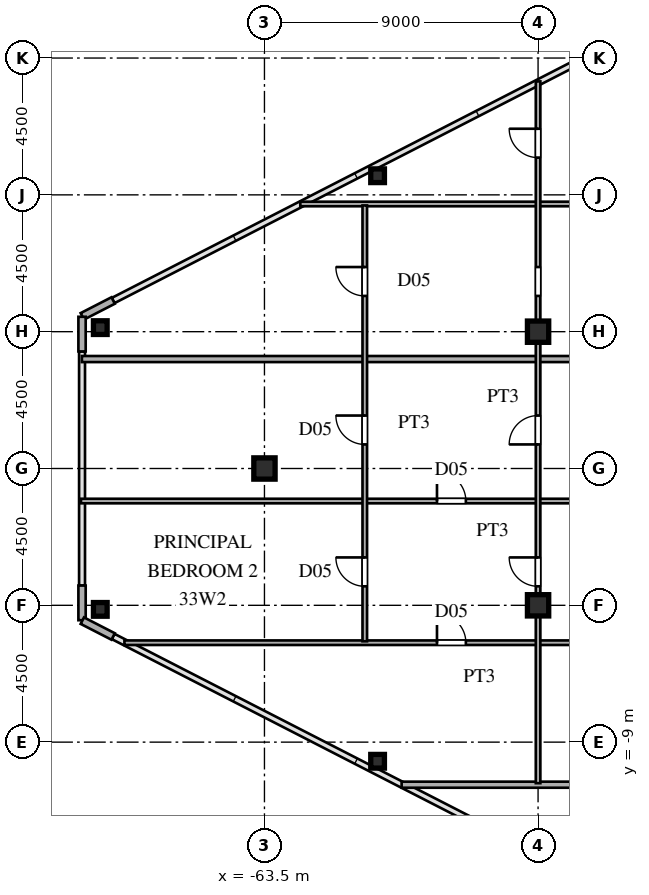
"""IFC4 building model, lengths in metres.
Left out: names, types, materials, properties, quantities, classifications, styles, units other than length and angle.
Written with IfcOpenShell. Run it as: python <this file> out.ifc"""

import sys

from ifc_helpers import new_model, si_unit, direction, frame, frame_2d, origin, origin_2d, place, context, subcontext, project, spatial, rectangle, hollow_rectangle, i_section, extrude, source, transform, mapped, element, fill, save


model = new_model("IFC4")
c1 = context("Model", 3, precision=1e-05, world=origin(), true_north=direction((0.0, 1.0)))
c2 = subcontext(c1, "Body", "Model", "MODEL_VIEW")
j1 = project(units=[si_unit("LENGTHUNIT", "METRE"), si_unit("PLANEANGLEUNIT", "RADIAN")], contexts=[c1])
p1 = place(None, origin())
s1 = spatial("IfcSite", under=j1, at=p1, CompositionType="ELEMENT")
p2 = place(p1, origin())
s2 = spatial("IfcBuilding", under=s1, at=p2, CompositionType="ELEMENT")
p3 = place(p2, frame((0.0, 0.0, 124.8)))
s3 = spatial("IfcBuildingStorey", under=s2, at=p3, CompositionType="ELEMENT", Elevation=124.8)
m1 = source(origin(), c2, "Body", "SweptSolid", [
    extrude(i_section(OverallWidth=0.7, OverallDepth=0.7, WebThickness=0.028, FlangeThickness=0.045, at=origin_2d()), origin(), (0.0, 0.0, 1.0), 3.6),
])
for number, where, z_axis, x_axis in (
    (1, (-54.5, -4.5, 0.0), (0.0, 0.0, 1.0), (1.0, 0.0, 0.0)),
    (2, (-54.5, 4.5, 0.0), (0.0, 0.0, 1.0), (1.0, 0.0, 0.0)),
    (3, (-63.5, 0.0, 0.0), (0.0, 0.0, 1.0), (1.0, 0.0, 0.0)),
):
    element("IfcColumn", number, at=place(p3, frame(where, z_axis=z_axis, x_axis=x_axis)), inside=s3, PredefinedType="COLUMN", context=c2, shape_type="MappedRepresentation", body=[
        mapped(m1, transform((0.0, 0.0, 0.0), scale=1.0)),
    ])
m2 = source(origin(), c2, "Body", "SweptSolid", [
    extrude(hollow_rectangle(XDim=0.45, YDim=0.45, WallThickness=0.018, at=origin_2d()), origin(), (0.0, 0.0, 1.0), 3.6),
])
for number, where, z_axis, x_axis in (
    (4, (-68.9, 4.634, 0.0), (0.0, 0.0, 1.0), (1.0, 0.0, 0.0)),
    (5, (-68.9, -4.634, 0.0), (0.0, 0.0, 1.0), (1.0, 0.0, 0.0)),
    (6, (-59.779, -9.629, 0.0), (0.0, 0.0, 1.0), (1.0, 0.0, 0.0)),
    (7, (-59.779, 9.629, 0.0), (0.0, 0.0, 1.0), (1.0, 0.0, 0.0)),
):
    element("IfcColumn", number, at=place(p3, frame(where, z_axis=z_axis, x_axis=x_axis)), inside=s3, PredefinedType="COLUMN", context=c2, shape_type="MappedRepresentation", body=[
        mapped(m2, transform((0.0, 0.0, 0.0), scale=1.0)),
    ])
p4 = place(p3, frame((-68.477, 5.525, 0.0), z_axis=(0.0, 0.0, 1.0), x_axis=(-0.889797395748, -0.456355776255, 0.0)))
e8 = element("IfcWall", 8, at=p4, inside=s3, PredefinedType="SOLIDWALL", context=c2, shape_type="SweptSolid", body=[
    extrude(rectangle(XDim=1.14, YDim=0.24, at=frame_2d((0.57, 0.0))), origin(), (0.0, 0.0, 1.0), 3.38),
])
for number, where, z_axis, x_axis in (
    (9, (-69.5, 4.99, 0.0), (0.0, 0.0, 1.0), (0.0, -1.0, 0.0)),
    (10, (-69.5, -3.85, 0.0), (0.0, 0.0, 1.0), (0.0, -1.0, 0.0)),
):
    element("IfcWall", number, at=place(p3, frame(where, z_axis=z_axis, x_axis=x_axis)), inside=s3, PredefinedType="SOLIDWALL", context=c2, shape_type="SweptSolid", body=[
        extrude(rectangle(XDim=1.14, YDim=0.24, at=frame_2d((0.57, 0.0))), origin(), (0.0, 0.0, 1.0), 3.38),
    ])
p5 = place(p3, frame((-69.491, -5.005, 0.0), z_axis=(0.0, 0.0, 1.0), x_axis=(0.889797395748, -0.456355776255, 0.0)))
e11 = element("IfcWall", 11, at=p5, inside=s3, PredefinedType="SOLIDWALL", context=c2, shape_type="SweptSolid", body=[
    extrude(rectangle(XDim=1.14, YDim=0.24, at=frame_2d((0.57, 0.0))), origin(), (0.0, 0.0, 1.0), 3.38),
])
p6 = place(p3, frame((-58.988, -10.4, 0.0), z_axis=(0.0, 0.0, 1.0), x_axis=(1.0, 0.0, 0.0)))
e12 = element("IfcWall", 12, at=p6, inside=s3, PredefinedType="PARTITIONING", context=c2, shape_type="SweptSolid", body=[
    extrude(rectangle(XDim=19.958, YDim=0.2, at=frame_2d((9.979, 0.0))), origin(), (0.0, 0.0, 1.0), 3.38),
])
p7 = place(p3, frame((-68.106, -5.73, 0.0), z_axis=(0.0, 0.0, 1.0), x_axis=(1.0, 0.0, 0.0)))
e13 = element("IfcWall", 13, at=p7, inside=s3, PredefinedType="PARTITIONING", context=c2, shape_type="SweptSolid", body=[
    extrude(rectangle(XDim=25.656, YDim=0.15, at=frame_2d((12.828, 0.0))), origin(), (0.0, 0.0, 1.0), 3.38),
])
p8 = place(p7, frame((23.079, 0.0, 0.0)))
e14 = element("IfcOpeningElement", 14, at=p8, cuts=e13, PredefinedType="OPENING", context=c2, shape_type="SweptSolid", body=[
    extrude(rectangle(XDim=0.95, YDim=2.15, at=frame_2d((0.475, 1.075))), frame((0.0, 0.085, 0.0), z_axis=(0.0, -1.0, 0.0), x_axis=(1.0, 0.0, 0.0)), (0.0, 0.0, 1.0), 0.17),
])
p9 = place(p7, frame((10.281, 0.0, 0.0)))
e15 = element("IfcOpeningElement", 15, at=p9, cuts=e13, PredefinedType="OPENING", context=c2, shape_type="SweptSolid", body=[
    extrude(rectangle(XDim=0.95, YDim=2.15, at=frame_2d((0.475, 1.075))), frame((0.0, 0.085, 0.0), z_axis=(0.0, -1.0, 0.0), x_axis=(1.0, 0.0, 0.0)), (0.0, 0.0, 1.0), 0.17),
])
p10 = place(p3, frame((-69.535, -1.07, 0.0), z_axis=(0.0, 0.0, 1.0), x_axis=(1.0, 0.0, 0.0)))
e16 = element("IfcWall", 16, at=p10, inside=s3, PredefinedType="PARTITIONING", context=c2, shape_type="SweptSolid", body=[
    extrude(rectangle(XDim=27.085, YDim=0.15, at=frame_2d((13.542, 0.0))), origin(), (0.0, 0.0, 1.0), 3.38),
])
p11 = place(p10, frame((23.635, 0.0, 0.0)))
e17 = element("IfcOpeningElement", 17, at=p11, cuts=e16, PredefinedType="OPENING", context=c2, shape_type="SweptSolid", body=[
    extrude(rectangle(XDim=0.95, YDim=2.15, at=frame_2d((0.475, 1.075))), frame((0.0, 0.085, 0.0), z_axis=(0.0, -1.0, 0.0), x_axis=(1.0, 0.0, 0.0)), (0.0, 0.0, 1.0), 0.17),
])
p12 = place(p10, frame((11.71, 0.0, 0.0)))
e18 = element("IfcOpeningElement", 18, at=p12, cuts=e16, PredefinedType="OPENING", context=c2, shape_type="SweptSolid", body=[
    extrude(rectangle(XDim=0.95, YDim=2.15, at=frame_2d((0.475, 1.075))), frame((0.0, 0.085, 0.0), z_axis=(0.0, -1.0, 0.0), x_axis=(1.0, 0.0, 0.0)), (0.0, 0.0, 1.0), 0.17),
])
p13 = place(p3, frame((-69.505, 3.6, 0.0), z_axis=(0.0, 0.0, 1.0), x_axis=(1.0, 0.0, 0.0)))
e19 = element("IfcWall", 19, at=p13, inside=s3, PredefinedType="PARTITIONING", context=c2, shape_type="SweptSolid", body=[
    extrude(rectangle(XDim=30.475, YDim=0.2, at=frame_2d((15.237, 0.0))), origin(), (0.0, 0.0, 1.0), 3.38),
])
p14 = place(p3, frame((-62.321, 8.7, 0.0), z_axis=(0.0, 0.0, 1.0), x_axis=(1.0, 0.0, 0.0)))
e20 = element("IfcWall", 20, at=p14, inside=s3, PredefinedType="PARTITIONING", context=c2, shape_type="SweptSolid", body=[
    extrude(rectangle(XDim=19.871, YDim=0.15, at=frame_2d((9.936, 0.0))), origin(), (0.0, 0.0, 1.0), 3.38),
])
p15 = place(p14, frame((16.421, 0.0, 0.0)))
e21 = element("IfcOpeningElement", 21, at=p15, cuts=e20, PredefinedType="OPENING", context=c2, shape_type="SweptSolid", body=[
    extrude(rectangle(XDim=0.95, YDim=2.15, at=frame_2d((0.475, 1.075))), frame((0.0, 0.085, 0.0), z_axis=(0.0, -1.0, 0.0), x_axis=(1.0, 0.0, 0.0)), (0.0, 0.0, 1.0), 0.17),
])
p16 = place(p3, frame((-60.2, -5.683, 0.0), z_axis=(0.0, 0.0, 1.0), x_axis=(0.0, 1.0, 0.0)))
e22 = element("IfcWall", 22, at=p16, inside=s3, PredefinedType="PARTITIONING", context=c2, shape_type="SweptSolid", body=[
    extrude(rectangle(XDim=14.335, YDim=0.15, at=frame_2d((7.167, 0.0))), origin(), (0.0, 0.0, 1.0), 3.38),
])
p17 = place(p16, frame((1.808, 0.0, 0.0)))
e23 = element("IfcOpeningElement", 23, at=p17, cuts=e22, PredefinedType="OPENING", context=c2, shape_type="SweptSolid", body=[
    extrude(rectangle(XDim=0.95, YDim=2.15, at=frame_2d((0.475, 1.075))), frame((0.0, 0.085, 0.0), z_axis=(0.0, -1.0, 0.0), x_axis=(1.0, 0.0, 0.0)), (0.0, 0.0, 1.0), 0.17),
])
p18 = place(p16, frame((6.475, 0.0, 0.0)))
e24 = element("IfcOpeningElement", 24, at=p18, cuts=e22, PredefinedType="OPENING", context=c2, shape_type="SweptSolid", body=[
    extrude(rectangle(XDim=0.95, YDim=2.15, at=frame_2d((0.475, 1.075))), frame((0.0, 0.085, 0.0), z_axis=(0.0, -1.0, 0.0), x_axis=(1.0, 0.0, 0.0)), (0.0, 0.0, 1.0), 0.17),
])
p19 = place(p16, frame((11.359, 0.0, 0.0)))
e25 = element("IfcOpeningElement", 25, at=p19, cuts=e22, PredefinedType="OPENING", context=c2, shape_type="SweptSolid", body=[
    extrude(rectangle(XDim=0.95, YDim=2.15, at=frame_2d((0.475, 1.075))), frame((0.0, 0.085, 0.0), z_axis=(0.0, -1.0, 0.0), x_axis=(1.0, 0.0, 0.0)), (0.0, 0.0, 1.0), 0.17),
])
p20 = place(p3, frame((-54.5, -10.35, 0.0), z_axis=(0.0, 0.0, 1.0), x_axis=(0.0, 1.0, 0.0)))
e26 = element("IfcWall", 26, at=p20, inside=s3, PredefinedType="PARTITIONING", context=c2, shape_type="SweptSolid", body=[
    extrude(rectangle(XDim=23.082, YDim=0.15, at=frame_2d((11.541, 0.0))), origin(), (0.0, 0.0, 1.0), 2.78),
])
p21 = place(p20, frame((6.475, 0.0, 0.0)))
e27 = element("IfcOpeningElement", 27, at=p21, cuts=e26, PredefinedType="OPENING", context=c2, shape_type="SweptSolid", body=[
    extrude(rectangle(XDim=0.95, YDim=2.15, at=frame_2d((0.475, 1.075))), frame((0.0, 0.085, 0.0), z_axis=(0.0, -1.0, 0.0), x_axis=(1.0, 0.0, 0.0)), (0.0, 0.0, 1.0), 0.17),
])
p22 = place(p20, frame((11.142, 0.0, 0.0)))
e28 = element("IfcOpeningElement", 28, at=p22, cuts=e26, PredefinedType="OPENING", context=c2, shape_type="SweptSolid", body=[
    extrude(rectangle(XDim=0.95, YDim=2.15, at=frame_2d((0.475, 1.075))), frame((0.0, 0.085, 0.0), z_axis=(0.0, -1.0, 0.0), x_axis=(1.0, 0.0, 0.0)), (0.0, 0.0, 1.0), 0.17),
])
p23 = place(p20, frame((20.575, 0.0, 0.0)))
e29 = element("IfcOpeningElement", 29, at=p23, cuts=e26, PredefinedType="OPENING", context=c2, shape_type="SweptSolid", body=[
    extrude(rectangle(XDim=0.95, YDim=2.15, at=frame_2d((0.475, 1.075))), frame((0.0, 0.085, 0.0), z_axis=(0.0, -1.0, 0.0), x_axis=(1.0, 0.0, 0.0)), (0.0, 0.0, 1.0), 0.17),
])
p24 = place(p20, frame((16.026, 0.0, 0.0)))
e30 = element("IfcOpeningElement", 30, at=p24, cuts=e26, PredefinedType="OPENING", context=c2, shape_type="SweptSolid", body=[
    extrude(rectangle(XDim=0.95, YDim=2.15, at=frame_2d((0.475, 1.075))), frame((0.0, 0.085, 0.0), z_axis=(0.0, -1.0, 0.0), x_axis=(1.0, 0.0, 0.0)), (0.0, 0.0, 1.0), 0.17),
])
m3 = source(origin(), c2, "Body", "SweptSolid", [
    extrude(rectangle(XDim=0.95, YDim=2.15, at=frame_2d((0.475, 1.075))), frame((0.0, 0.025, 0.0), z_axis=(0.0, -1.0, 0.0), x_axis=(1.0, 0.0, 0.0)), (0.0, 0.0, 1.0), 0.05),
])
p25 = place(p9, origin())
e31 = element("IfcDoor", 31, at=p25, inside=s3, OperationType="SINGLE_SWING_LEFT", PredefinedType="DOOR", context=c2, shape_type="MappedRepresentation", body=[
    mapped(m3, transform((0.0, 0.0, 0.0), scale=1.0)),
])
fill(e15, e31)
p26 = place(p12, origin())
e32 = element("IfcDoor", 32, at=p26, inside=s3, OperationType="SINGLE_SWING_LEFT", PredefinedType="DOOR", context=c2, shape_type="MappedRepresentation", body=[
    mapped(m3, transform((0.0, 0.0, 0.0), scale=1.0)),
])
fill(e18, e32)
p27 = place(p17, origin())
e33 = element("IfcDoor", 33, at=p27, inside=s3, OperationType="SINGLE_SWING_RIGHT", PredefinedType="DOOR", context=c2, shape_type="MappedRepresentation", body=[
    mapped(m3, transform((0.0, 0.0, 0.0), scale=1.0)),
])
fill(e23, e33)
p28 = place(p18, origin())
e34 = element("IfcDoor", 34, at=p28, inside=s3, OperationType="SINGLE_SWING_RIGHT", PredefinedType="DOOR", context=c2, shape_type="MappedRepresentation", body=[
    mapped(m3, transform((0.0, 0.0, 0.0), scale=1.0)),
])
fill(e24, e34)
p29 = place(p19, origin())
e35 = element("IfcDoor", 35, at=p29, inside=s3, OperationType="SINGLE_SWING_RIGHT", PredefinedType="DOOR", context=c2, shape_type="MappedRepresentation", body=[
    mapped(m3, transform((0.0, 0.0, 0.0), scale=1.0)),
])
fill(e25, e35)
p30 = place(p21, origin())
e36 = element("IfcDoor", 36, at=p30, inside=s3, OperationType="SINGLE_SWING_RIGHT", PredefinedType="DOOR", context=c2, shape_type="MappedRepresentation", body=[
    mapped(m3, transform((0.0, 0.0, 0.0), scale=1.0)),
])
fill(e27, e36)
p31 = place(p22, origin())
e37 = element("IfcDoor", 37, at=p31, inside=s3, OperationType="SINGLE_SWING_LEFT", PredefinedType="DOOR", context=c2, shape_type="MappedRepresentation", body=[
    mapped(m3, transform((0.0, 0.0, 0.0), scale=1.0)),
])
fill(e28, e37)
p32 = place(p23, origin())
e38 = element("IfcDoor", 38, at=p32, inside=s3, OperationType="SINGLE_SWING_RIGHT", PredefinedType="DOOR", context=c2, shape_type="MappedRepresentation", body=[
    mapped(m3, transform((0.0, 0.0, 0.0), scale=1.0)),
])
fill(e29, e38)
save(model, sys.argv[1])
